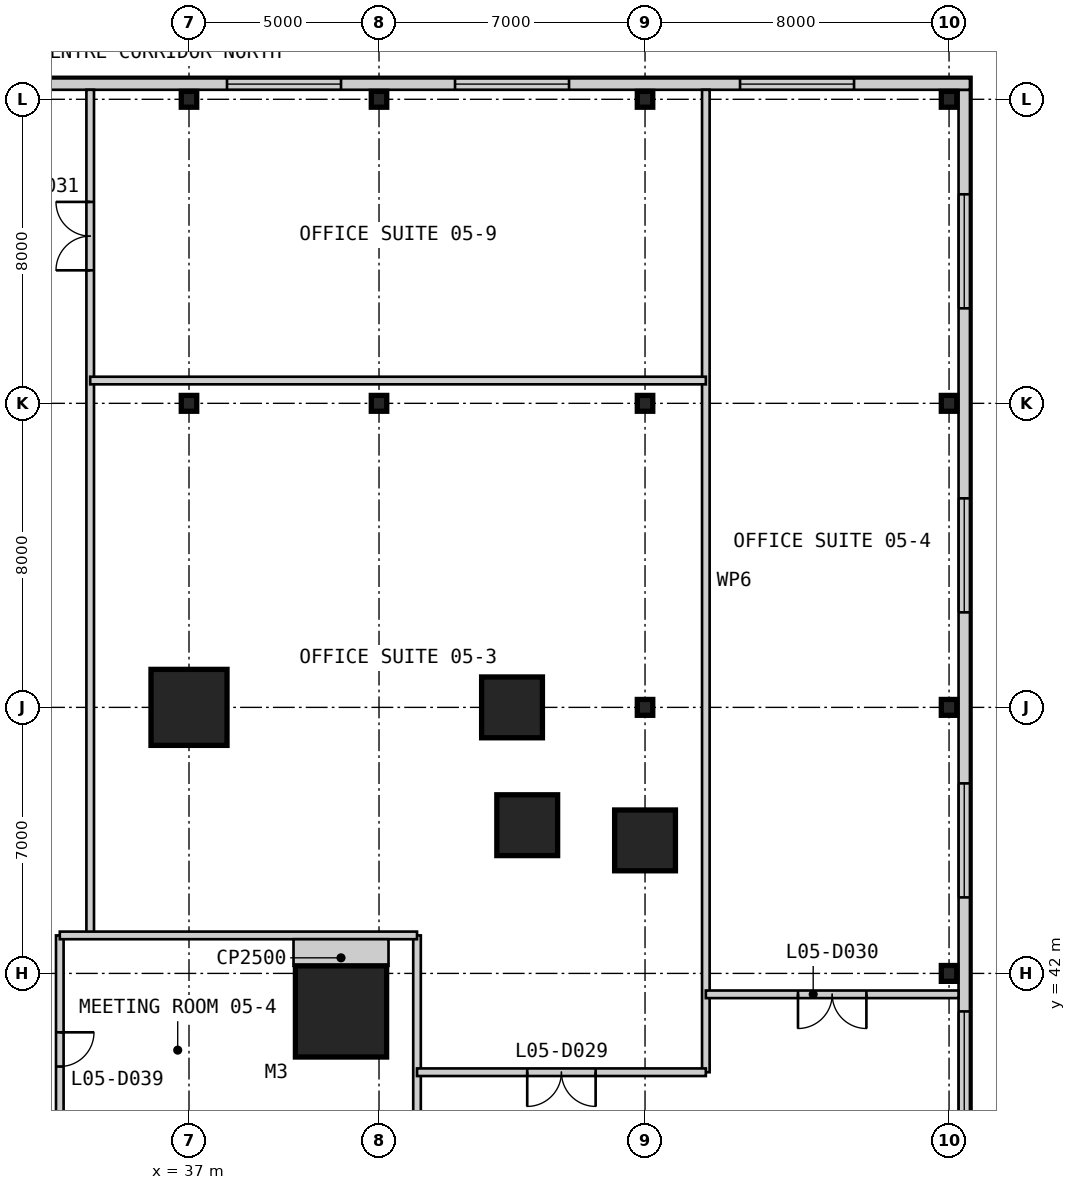
"""IFC4 building model, lengths in metres.
Left out: names, types, materials, properties, quantities, classifications, styles, units other than length and angle.
Written with IfcOpenShell. Run it as: python <this file> out.ifc"""

import sys

from ifc_helpers import new_model, si_unit, direction, frame, frame_2d, origin, origin_2d, place, context, subcontext, project, spatial, rectangle, i_section, extrude, element, fill, save


model = new_model("IFC4")
c1 = context("Model", 3, precision=1e-05, world=origin(), true_north=direction((0.0, 1.0)))
c2 = subcontext(c1, "Body", "Model", "MODEL_VIEW")
j1 = project(units=[si_unit("LENGTHUNIT", "METRE"), si_unit("PLANEANGLEUNIT", "RADIAN")], contexts=[c1])
p1 = place(None, origin())
s1 = spatial("IfcSite", under=j1, at=p1, CompositionType="ELEMENT")
p2 = place(p1, origin())
s2 = spatial("IfcBuilding", under=s1, at=p2, CompositionType="ELEMENT")
p3 = place(p2, frame((0.0, 0.0, 26.2)))
s3 = spatial("IfcBuildingStorey", under=s2, at=p3, CompositionType="ELEMENT", Elevation=26.2)
p4 = place(p3, frame((41.0, 41.0, 0.0), z_axis=(0.0, 0.0, 1.0), x_axis=(1.0, 0.0, 0.0)))
e1 = element("IfcColumn", 1, at=p4, inside=s3, PredefinedType="COLUMN", context=c2, shape_type="SweptSolid", body=[
    extrude(rectangle(XDim=2.4, YDim=2.4, at=origin_2d()), origin(), (0.0, 0.0, 1.0), 4.8),
])
for number, where, z_axis, x_axis in (
    (2, (49.0, 45.5, 0.0), (0.0, 0.0, 1.0), (1.0, 0.0, 0.0)),
    (3, (45.9, 45.9, 0.0), (0.0, 0.0, 1.0), (1.0, 0.0, 0.0)),
    (4, (45.5, 49.0, 0.0), (0.0, 0.0, 1.0), (1.0, 0.0, 0.0)),
):
    element("IfcColumn", number, at=place(p3, frame(where, z_axis=z_axis, x_axis=x_axis)), inside=s3, PredefinedType="COLUMN", context=c2, shape_type="SweptSolid", body=[
        extrude(rectangle(XDim=1.6, YDim=1.6, at=origin_2d()), origin(), (0.0, 0.0, 1.0), 4.8),
    ])
p5 = place(p3, frame((37.0, 49.0, 0.0), z_axis=(0.0, 0.0, 1.0), x_axis=(1.0, 0.0, 0.0)))
e5 = element("IfcColumn", 5, at=p5, inside=s3, PredefinedType="COLUMN", context=c2, shape_type="SweptSolid", body=[
    extrude(rectangle(XDim=2.0, YDim=2.0, at=origin_2d()), origin(), (0.0, 0.0, 1.0), 4.8),
])
for number, where, z_axis, x_axis in (
    (6, (37.0, 57.0, 0.0), (0.0, 0.0, 1.0), (1.0, 0.0, 0.0)),
    (7, (37.0, 65.0, 0.0), (0.0, 0.0, 1.0), (1.0, 0.0, 0.0)),
    (8, (42.0, 57.0, 0.0), (0.0, 0.0, 1.0), (1.0, 0.0, 0.0)),
    (9, (42.0, 65.0, 0.0), (0.0, 0.0, 1.0), (1.0, 0.0, 0.0)),
    (10, (49.0, 49.0, 0.0), (0.0, 0.0, 1.0), (1.0, 0.0, 0.0)),
    (11, (49.0, 57.0, 0.0), (0.0, 0.0, 1.0), (1.0, 0.0, 0.0)),
    (12, (49.0, 65.0, 0.0), (0.0, 0.0, 1.0), (1.0, 0.0, 0.0)),
    (13, (57.0, 42.0, 0.0), (0.0, 0.0, 1.0), (1.0, 0.0, 0.0)),
    (14, (57.0, 49.0, 0.0), (0.0, 0.0, 1.0), (1.0, 0.0, 0.0)),
    (15, (57.0, 57.0, 0.0), (0.0, 0.0, 1.0), (1.0, 0.0, 0.0)),
    (16, (57.0, 65.0, 0.0), (0.0, 0.0, 1.0), (1.0, 0.0, 0.0)),
):
    element("IfcColumn", number, at=place(p3, frame(where, z_axis=z_axis, x_axis=x_axis)), inside=s3, PredefinedType="COLUMN", context=c2, shape_type="SweptSolid", body=[
        extrude(i_section(OverallWidth=0.406, OverallDepth=0.417, WebThickness=0.03, FlangeThickness=0.048, at=origin_2d()), origin(), (0.0, 0.0, 1.0), 4.8),
    ])
p6 = place(p3, frame((57.4, -7.25, 0.0), z_axis=(0.0, 0.0, 1.0), x_axis=(0.0, 1.0, 0.0)))
e17 = element("IfcWall", 17, at=p6, inside=s3, PredefinedType="SOLIDWALL", context=c2, shape_type="SweptSolid", body=[
    extrude(rectangle(XDim=72.5, YDim=0.3, at=frame_2d((36.25, 0.0))), origin(), (0.0, 0.0, 1.0), 4.5),
])
p7 = place(p6, frame((2.75, 0.0, 0.9)))
e18 = element("IfcOpeningElement", 18, at=p7, cuts=e17, PredefinedType="OPENING", context=c2, shape_type="SweptSolid", body=[
    extrude(rectangle(XDim=3.0, YDim=2.4, at=frame_2d((1.5, 1.2))), frame((0.0, 0.16, 0.0), z_axis=(0.0, -1.0, 0.0), x_axis=(1.0, 0.0, 0.0)), (0.0, 0.0, 1.0), 0.32),
])
p8 = place(p6, frame((10.75, 0.0, 0.9)))
e19 = element("IfcOpeningElement", 19, at=p8, cuts=e17, PredefinedType="OPENING", context=c2, shape_type="SweptSolid", body=[
    extrude(rectangle(XDim=3.0, YDim=2.4, at=frame_2d((1.5, 1.2))), frame((0.0, 0.16, 0.0), z_axis=(0.0, -1.0, 0.0), x_axis=(1.0, 0.0, 0.0)), (0.0, 0.0, 1.0), 0.32),
])
p9 = place(p6, frame((24.75, 0.0, 0.9)))
e20 = element("IfcOpeningElement", 20, at=p9, cuts=e17, PredefinedType="OPENING", context=c2, shape_type="SweptSolid", body=[
    extrude(rectangle(XDim=3.0, YDim=2.4, at=frame_2d((1.5, 1.2))), frame((0.0, 0.16, 0.0), z_axis=(0.0, -1.0, 0.0), x_axis=(1.0, 0.0, 0.0)), (0.0, 0.0, 1.0), 0.32),
])
p10 = place(p6, frame((36.75, 0.0, 0.9)))
e21 = element("IfcOpeningElement", 21, at=p10, cuts=e17, PredefinedType="OPENING", context=c2, shape_type="SweptSolid", body=[
    extrude(rectangle(XDim=3.0, YDim=2.4, at=frame_2d((1.5, 1.2))), frame((0.0, 0.16, 0.0), z_axis=(0.0, -1.0, 0.0), x_axis=(1.0, 0.0, 0.0)), (0.0, 0.0, 1.0), 0.32),
])
p11 = place(p6, frame((45.25, 0.0, 0.9)))
e22 = element("IfcOpeningElement", 22, at=p11, cuts=e17, PredefinedType="OPENING", context=c2, shape_type="SweptSolid", body=[
    extrude(rectangle(XDim=3.0, YDim=2.4, at=frame_2d((1.5, 1.2))), frame((0.0, 0.16, 0.0), z_axis=(0.0, -1.0, 0.0), x_axis=(1.0, 0.0, 0.0)), (0.0, 0.0, 1.0), 0.32),
])
p12 = place(p6, frame((51.25, 0.0, 0.9)))
e23 = element("IfcOpeningElement", 23, at=p12, cuts=e17, PredefinedType="OPENING", context=c2, shape_type="SweptSolid", body=[
    extrude(rectangle(XDim=3.0, YDim=2.4, at=frame_2d((1.5, 1.2))), frame((0.0, 0.16, 0.0), z_axis=(0.0, -1.0, 0.0), x_axis=(1.0, 0.0, 0.0)), (0.0, 0.0, 1.0), 0.32),
])
p13 = place(p6, frame((58.75, 0.0, 0.9)))
e24 = element("IfcOpeningElement", 24, at=p13, cuts=e17, PredefinedType="OPENING", context=c2, shape_type="SweptSolid", body=[
    extrude(rectangle(XDim=3.0, YDim=2.4, at=frame_2d((1.5, 1.2))), frame((0.0, 0.16, 0.0), z_axis=(0.0, -1.0, 0.0), x_axis=(1.0, 0.0, 0.0)), (0.0, 0.0, 1.0), 0.32),
])
p14 = place(p6, frame((66.75, 0.0, 0.9)))
e25 = element("IfcOpeningElement", 25, at=p14, cuts=e17, PredefinedType="OPENING", context=c2, shape_type="SweptSolid", body=[
    extrude(rectangle(XDim=3.0, YDim=2.4, at=frame_2d((1.5, 1.2))), frame((0.0, 0.16, 0.0), z_axis=(0.0, -1.0, 0.0), x_axis=(1.0, 0.0, 0.0)), (0.0, 0.0, 1.0), 0.32),
])
p15 = place(p3, frame((57.55, 65.4, 0.0), z_axis=(0.0, 0.0, 1.0), x_axis=(-1.0, 0.0, 0.0)))
e26 = element("IfcWall", 26, at=p15, inside=s3, PredefinedType="SOLIDWALL", context=c2, shape_type="SweptSolid", body=[
    extrude(rectangle(XDim=65.1, YDim=0.3, at=frame_2d((32.55, 0.0))), origin(), (0.0, 0.0, 1.0), 4.5),
])
p16 = place(p15, frame((59.05, 0.0, 0.9)))
e27 = element("IfcOpeningElement", 27, at=p16, cuts=e26, PredefinedType="OPENING", context=c2, shape_type="SweptSolid", body=[
    extrude(rectangle(XDim=3.0, YDim=2.4, at=frame_2d((1.5, 1.2))), frame((0.0, 0.16, 0.0), z_axis=(0.0, -1.0, 0.0), x_axis=(1.0, 0.0, 0.0)), (0.0, 0.0, 1.0), 0.32),
])
p17 = place(p15, frame((51.05, 0.0, 0.9)))
e28 = element("IfcOpeningElement", 28, at=p17, cuts=e26, PredefinedType="OPENING", context=c2, shape_type="SweptSolid", body=[
    extrude(rectangle(XDim=3.0, YDim=2.4, at=frame_2d((1.5, 1.2))), frame((0.0, 0.16, 0.0), z_axis=(0.0, -1.0, 0.0), x_axis=(1.0, 0.0, 0.0)), (0.0, 0.0, 1.0), 0.32),
])
p18 = place(p15, frame((37.05, 0.0, 0.9)))
e29 = element("IfcOpeningElement", 29, at=p18, cuts=e26, PredefinedType="OPENING", context=c2, shape_type="SweptSolid", body=[
    extrude(rectangle(XDim=3.0, YDim=2.4, at=frame_2d((1.5, 1.2))), frame((0.0, 0.16, 0.0), z_axis=(0.0, -1.0, 0.0), x_axis=(1.0, 0.0, 0.0)), (0.0, 0.0, 1.0), 0.32),
])
p19 = place(p15, frame((25.05, 0.0, 0.9)))
e30 = element("IfcOpeningElement", 30, at=p19, cuts=e26, PredefinedType="OPENING", context=c2, shape_type="SweptSolid", body=[
    extrude(rectangle(XDim=3.0, YDim=2.4, at=frame_2d((1.5, 1.2))), frame((0.0, 0.16, 0.0), z_axis=(0.0, -1.0, 0.0), x_axis=(1.0, 0.0, 0.0)), (0.0, 0.0, 1.0), 0.32),
])
p20 = place(p15, frame((16.55, 0.0, 0.9)))
e31 = element("IfcOpeningElement", 31, at=p20, cuts=e26, PredefinedType="OPENING", context=c2, shape_type="SweptSolid", body=[
    extrude(rectangle(XDim=3.0, YDim=2.4, at=frame_2d((1.5, 1.2))), frame((0.0, 0.16, 0.0), z_axis=(0.0, -1.0, 0.0), x_axis=(1.0, 0.0, 0.0)), (0.0, 0.0, 1.0), 0.32),
])
p21 = place(p15, frame((10.55, 0.0, 0.9)))
e32 = element("IfcOpeningElement", 32, at=p21, cuts=e26, PredefinedType="OPENING", context=c2, shape_type="SweptSolid", body=[
    extrude(rectangle(XDim=3.0, YDim=2.4, at=frame_2d((1.5, 1.2))), frame((0.0, 0.16, 0.0), z_axis=(0.0, -1.0, 0.0), x_axis=(1.0, 0.0, 0.0)), (0.0, 0.0, 1.0), 0.32),
])
p22 = place(p15, frame((3.05, 0.0, 0.9)))
e33 = element("IfcOpeningElement", 33, at=p22, cuts=e26, PredefinedType="OPENING", context=c2, shape_type="SweptSolid", body=[
    extrude(rectangle(XDim=3.0, YDim=2.4, at=frame_2d((1.5, 1.2))), frame((0.0, 0.16, 0.0), z_axis=(0.0, -1.0, 0.0), x_axis=(1.0, 0.0, 0.0)), (0.0, 0.0, 1.0), 0.32),
])
p23 = place(p3, frame((33.6, 37.0, 0.0), z_axis=(0.0, 0.0, 1.0), x_axis=(0.0, 1.0, 0.0)))
e34 = element("IfcWall", 34, at=p23, inside=s3, PredefinedType="PARTITIONING", context=c2, shape_type="SweptSolid", body=[
    extrude(rectangle(XDim=6.0, YDim=0.2, at=frame_2d((3.0, 0.0))), origin(), (0.0, 0.0, 1.0), 4.5),
])
p24 = place(p23, frame((2.55, 0.0, 0.0)))
e35 = element("IfcOpeningElement", 35, at=p24, cuts=e34, PredefinedType="OPENING", context=c2, shape_type="SweptSolid", body=[
    extrude(rectangle(XDim=0.9, YDim=2.2, at=frame_2d((0.45, 1.1))), frame((0.0, 0.11, 0.0), z_axis=(0.0, -1.0, 0.0), x_axis=(1.0, 0.0, 0.0)), (0.0, 0.0, 1.0), 0.22),
])
p25 = place(p3, frame((34.4, 43.0, 0.0), z_axis=(0.0, 0.0, 1.0), x_axis=(0.0, 1.0, 0.0)))
e36 = element("IfcWall", 36, at=p25, inside=s3, PredefinedType="PARTITIONING", context=c2, shape_type="SweptSolid", body=[
    extrude(rectangle(XDim=22.25, YDim=0.2, at=frame_2d((11.125, 0.0))), origin(), (0.0, 0.0, 1.0), 4.5),
])
p26 = place(p25, frame((17.5, 0.0, 0.0)))
e37 = element("IfcOpeningElement", 37, at=p26, cuts=e36, PredefinedType="OPENING", context=c2, shape_type="SweptSolid", body=[
    extrude(rectangle(XDim=1.8, YDim=2.4, at=frame_2d((0.9, 1.2))), frame((0.0, 0.11, 0.0), z_axis=(0.0, -1.0, 0.0), x_axis=(1.0, 0.0, 0.0)), (0.0, 0.0, 1.0), 0.22),
])
p27 = place(p3, frame((43.0, 37.0, 0.0), z_axis=(0.0, 0.0, 1.0), x_axis=(0.0, 1.0, 0.0)))
e38 = element("IfcWall", 38, at=p27, inside=s3, PredefinedType="PARTITIONING", context=c2, shape_type="SweptSolid", body=[
    extrude(rectangle(XDim=6.0, YDim=0.2, at=frame_2d((3.0, 0.0))), origin(), (0.0, 0.0, 1.0), 4.5),
])
p28 = place(p3, frame((50.6, 39.4, 0.0), z_axis=(0.0, 0.0, 1.0), x_axis=(0.0, 1.0, 0.0)))
e39 = element("IfcWall", 39, at=p28, inside=s3, PredefinedType="PARTITIONING", context=c2, shape_type="SweptSolid", body=[
    extrude(rectangle(XDim=25.85, YDim=0.2, at=frame_2d((12.925, 0.0))), origin(), (0.0, 0.0, 1.0), 4.5),
])
p29 = place(p3, frame((43.0, 39.4, 0.0), z_axis=(0.0, 0.0, 1.0), x_axis=(1.0, 0.0, 0.0)))
e40 = element("IfcWall", 40, at=p29, inside=s3, PredefinedType="PARTITIONING", context=c2, shape_type="SweptSolid", body=[
    extrude(rectangle(XDim=7.6, YDim=0.2, at=frame_2d((3.8, 0.0))), origin(), (0.0, 0.0, 1.0), 4.5),
])
p30 = place(p29, frame((2.9, 0.0, 0.0)))
e41 = element("IfcOpeningElement", 41, at=p30, cuts=e40, PredefinedType="OPENING", context=c2, shape_type="SweptSolid", body=[
    extrude(rectangle(XDim=1.8, YDim=2.4, at=frame_2d((0.9, 1.2))), frame((0.0, 0.11, 0.0), z_axis=(0.0, -1.0, 0.0), x_axis=(1.0, 0.0, 0.0)), (0.0, 0.0, 1.0), 0.22),
])
p31 = place(p3, frame((50.6, 41.45, 0.0), z_axis=(0.0, 0.0, 1.0), x_axis=(1.0, 0.0, 0.0)))
e42 = element("IfcWall", 42, at=p31, inside=s3, PredefinedType="PARTITIONING", context=c2, shape_type="SweptSolid", body=[
    extrude(rectangle(XDim=6.65, YDim=0.2, at=frame_2d((3.325, 0.0))), origin(), (0.0, 0.0, 1.0), 4.5),
])
p32 = place(p31, frame((2.425, 0.0, 0.0)))
e43 = element("IfcOpeningElement", 43, at=p32, cuts=e42, PredefinedType="OPENING", context=c2, shape_type="SweptSolid", body=[
    extrude(rectangle(XDim=1.8, YDim=2.4, at=frame_2d((0.9, 1.2))), frame((0.0, 0.11, 0.0), z_axis=(0.0, -1.0, 0.0), x_axis=(1.0, 0.0, 0.0)), (0.0, 0.0, 1.0), 0.22),
])
p33 = place(p3, frame((33.6, 43.0, 0.0), z_axis=(0.0, 0.0, 1.0), x_axis=(1.0, 0.0, 0.0)))
e44 = element("IfcWall", 44, at=p33, inside=s3, PredefinedType="PARTITIONING", context=c2, shape_type="SweptSolid", body=[
    extrude(rectangle(XDim=9.4, YDim=0.2, at=frame_2d((4.7, 0.0))), origin(), (0.0, 0.0, 1.0), 4.5),
])
p34 = place(p3, frame((34.4, 57.6, 0.0), z_axis=(0.0, 0.0, 1.0), x_axis=(1.0, 0.0, 0.0)))
e45 = element("IfcWall", 45, at=p34, inside=s3, PredefinedType="PARTITIONING", context=c2, shape_type="SweptSolid", body=[
    extrude(rectangle(XDim=16.2, YDim=0.2, at=frame_2d((8.1, 0.0))), origin(), (0.0, 0.0, 1.0), 4.5),
])
p35 = place(p3, frame((41.0, 42.9, 0.0), z_axis=(0.0, 0.0, 1.0), x_axis=(0.0, -1.0, 0.0)))
e46 = element("IfcWall", 46, at=p35, inside=s3, PredefinedType="PARTITIONING", context=c2, shape_type="SweptSolid", body=[
    extrude(rectangle(XDim=0.7, YDim=2.5, at=frame_2d((0.35, 0.0))), origin(), (0.0, 0.0, 1.0), 4.5),
])
p36 = place(p11, origin())
e47 = element("IfcWindow", 47, at=p36, inside=s3, PartitioningType="SINGLE_PANEL", PredefinedType="WINDOW", context=c2, shape_type="SweptSolid", body=[
    extrude(rectangle(XDim=3.0, YDim=2.4, at=frame_2d((1.5, 1.2))), frame((0.0, 0.03, 0.0), z_axis=(0.0, -1.0, 0.0), x_axis=(1.0, 0.0, 0.0)), (0.0, 0.0, 1.0), 0.06),
])
fill(e22, e47)
p37 = place(p12, origin())
e48 = element("IfcWindow", 48, at=p37, inside=s3, PartitioningType="SINGLE_PANEL", PredefinedType="WINDOW", context=c2, shape_type="SweptSolid", body=[
    extrude(rectangle(XDim=3.0, YDim=2.4, at=frame_2d((1.5, 1.2))), frame((0.0, 0.03, 0.0), z_axis=(0.0, -1.0, 0.0), x_axis=(1.0, 0.0, 0.0)), (0.0, 0.0, 1.0), 0.06),
])
fill(e23, e48)
p38 = place(p13, origin())
e49 = element("IfcWindow", 49, at=p38, inside=s3, PartitioningType="SINGLE_PANEL", PredefinedType="WINDOW", context=c2, shape_type="SweptSolid", body=[
    extrude(rectangle(XDim=3.0, YDim=2.4, at=frame_2d((1.5, 1.2))), frame((0.0, 0.03, 0.0), z_axis=(0.0, -1.0, 0.0), x_axis=(1.0, 0.0, 0.0)), (0.0, 0.0, 1.0), 0.06),
])
fill(e24, e49)
p39 = place(p14, origin())
e50 = element("IfcWindow", 50, at=p39, inside=s3, PartitioningType="SINGLE_PANEL", PredefinedType="WINDOW", context=c2, shape_type="SweptSolid", body=[
    extrude(rectangle(XDim=3.0, YDim=2.4, at=frame_2d((1.5, 1.2))), frame((0.0, 0.03, 0.0), z_axis=(0.0, -1.0, 0.0), x_axis=(1.0, 0.0, 0.0)), (0.0, 0.0, 1.0), 0.06),
])
fill(e25, e50)
p40 = place(p20, origin())
e51 = element("IfcWindow", 51, at=p40, inside=s3, PartitioningType="SINGLE_PANEL", PredefinedType="WINDOW", context=c2, shape_type="SweptSolid", body=[
    extrude(rectangle(XDim=3.0, YDim=2.4, at=frame_2d((1.5, 1.2))), frame((0.0, 0.03, 0.0), z_axis=(0.0, -1.0, 0.0), x_axis=(1.0, 0.0, 0.0)), (0.0, 0.0, 1.0), 0.06),
])
fill(e31, e51)
p41 = place(p21, origin())
e52 = element("IfcWindow", 52, at=p41, inside=s3, PartitioningType="SINGLE_PANEL", PredefinedType="WINDOW", context=c2, shape_type="SweptSolid", body=[
    extrude(rectangle(XDim=3.0, YDim=2.4, at=frame_2d((1.5, 1.2))), frame((0.0, 0.03, 0.0), z_axis=(0.0, -1.0, 0.0), x_axis=(1.0, 0.0, 0.0)), (0.0, 0.0, 1.0), 0.06),
])
fill(e32, e52)
p42 = place(p22, origin())
e53 = element("IfcWindow", 53, at=p42, inside=s3, PartitioningType="SINGLE_PANEL", PredefinedType="WINDOW", context=c2, shape_type="SweptSolid", body=[
    extrude(rectangle(XDim=3.0, YDim=2.4, at=frame_2d((1.5, 1.2))), frame((0.0, 0.03, 0.0), z_axis=(0.0, -1.0, 0.0), x_axis=(1.0, 0.0, 0.0)), (0.0, 0.0, 1.0), 0.06),
])
fill(e33, e53)
p43 = place(p30, frame((1.8, 0.0, 0.0), z_axis=(0.0, 0.0, 1.0), x_axis=(-1.0, 0.0, 0.0)))
e54 = element("IfcDoor", 54, at=p43, inside=s3, OperationType="DOUBLE_DOOR_SINGLE_SWING", PredefinedType="DOOR", context=c2, shape_type="SweptSolid", body=[
    extrude(rectangle(XDim=1.8, YDim=2.4, at=frame_2d((0.9, 1.2))), frame((0.0, 0.025, 0.0), z_axis=(0.0, -1.0, 0.0), x_axis=(1.0, 0.0, 0.0)), (0.0, 0.0, 1.0), 0.05),
])
fill(e41, e54)
p44 = place(p32, frame((1.8, 0.0, 0.0), z_axis=(0.0, 0.0, 1.0), x_axis=(-1.0, 0.0, 0.0)))
e55 = element("IfcDoor", 55, at=p44, inside=s3, OperationType="DOUBLE_DOOR_SINGLE_SWING", PredefinedType="DOOR", context=c2, shape_type="SweptSolid", body=[
    extrude(rectangle(XDim=1.8, YDim=2.4, at=frame_2d((0.9, 1.2))), frame((0.0, 0.025, 0.0), z_axis=(0.0, -1.0, 0.0), x_axis=(1.0, 0.0, 0.0)), (0.0, 0.0, 1.0), 0.05),
])
fill(e43, e55)
p45 = place(p26, origin())
e56 = element("IfcDoor", 56, at=p45, inside=s3, OperationType="DOUBLE_DOOR_SINGLE_SWING", PredefinedType="DOOR", context=c2, shape_type="SweptSolid", body=[
    extrude(rectangle(XDim=1.8, YDim=2.4, at=frame_2d((0.9, 1.2))), frame((0.0, 0.025, 0.0), z_axis=(0.0, -1.0, 0.0), x_axis=(1.0, 0.0, 0.0)), (0.0, 0.0, 1.0), 0.05),
])
fill(e37, e56)
p46 = place(p24, frame((0.9, 0.0, 0.0), z_axis=(0.0, 0.0, 1.0), x_axis=(-1.0, 0.0, 0.0)))
e57 = element("IfcDoor", 57, at=p46, inside=s3, OperationType="SINGLE_SWING_LEFT", PredefinedType="DOOR", context=c2, shape_type="SweptSolid", body=[
    extrude(rectangle(XDim=0.9, YDim=2.2, at=frame_2d((0.45, 1.1))), frame((0.0, 0.025, 0.0), z_axis=(0.0, -1.0, 0.0), x_axis=(1.0, 0.0, 0.0)), (0.0, 0.0, 1.0), 0.05),
])
fill(e35, e57)
save(model, sys.argv[1])
